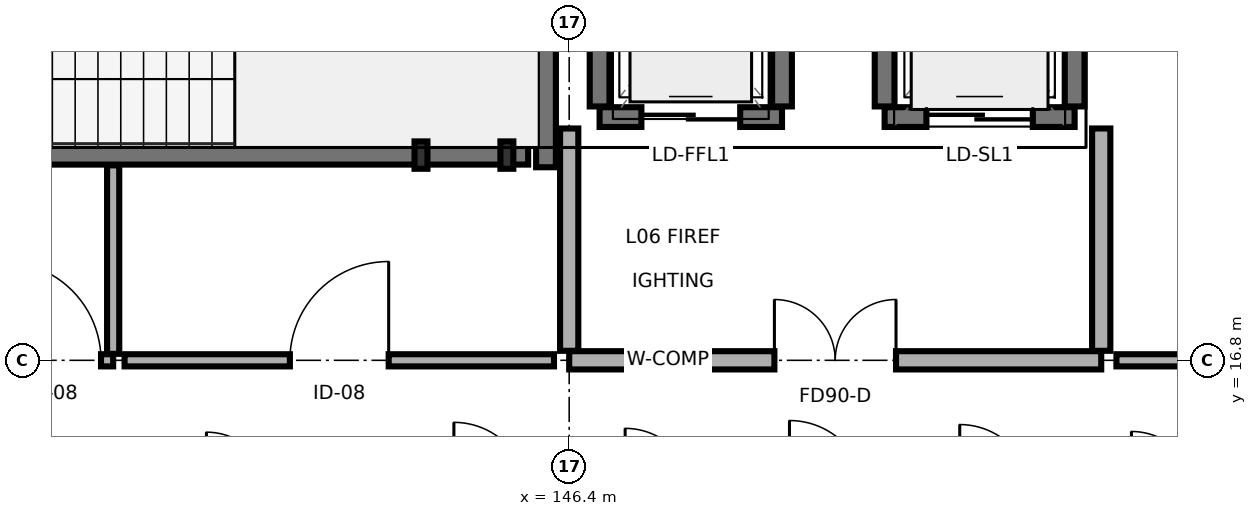
"""IFC4 building model, lengths in metres.
Left out: names, types, materials, properties, quantities, classifications, styles, units other than length and angle.
Written with IfcOpenShell. Run it as: python <this file> out.ifc"""

import sys

from ifc_helpers import new_model, si_unit, direction, frame, frame_2d, origin, origin_2d, place, context, subcontext, project, spatial, rectangle, i_section, extrude, element, fill, save


model = new_model("IFC4")
c1 = context("Model", 3, precision=1e-05, world=origin(), true_north=direction((0.0, 1.0)))
c2 = subcontext(c1, "Body", "Model", "MODEL_VIEW")
j1 = project(units=[si_unit("LENGTHUNIT", "METRE"), si_unit("PLANEANGLEUNIT", "RADIAN")], contexts=[c1])
p1 = place(None, origin())
s1 = spatial("IfcSite", under=j1, at=p1, CompositionType="ELEMENT")
p2 = place(p1, origin())
s2 = spatial("IfcBuilding", under=s1, at=p2, CompositionType="ELEMENT")
p3 = place(p2, frame((0.0, 0.0, 21.5)))
s3 = spatial("IfcBuildingStorey", under=s2, at=p3, CompositionType="ELEMENT", Elevation=21.5)
for number, where, z_axis, x_axis in (
    (1, (144.45, 19.5, 0.0), (0.0, 0.0, 1.0), (1.0, 0.0, 0.0)),
    (2, (145.58, 19.5, 0.0), (0.0, 0.0, 1.0), (1.0, 0.0, 0.0)),
):
    element("IfcColumn", number, at=place(p3, frame(where, z_axis=z_axis, x_axis=x_axis)), inside=s3, PredefinedType="PILASTER", context=c2, shape_type="SweptSolid", body=[
        extrude(i_section(OverallWidth=0.17, OverallDepth=0.36, WebThickness=0.008, FlangeThickness=0.013, FilletRadius=0.018, at=origin_2d()), origin(), (0.0, 0.0, 1.0), 3.4),
    ])
p4 = place(p3, frame((146.095, 19.34, 0.0), z_axis=(0.0, 0.0, 1.0), x_axis=(0.0, 1.0, 0.0)))
e3 = element("IfcWall", 3, at=p4, inside=s3, PredefinedType="SHEAR", context=c2, shape_type="SweptSolid", body=[
    extrude(rectangle(XDim=4.27, YDim=0.26, at=frame_2d((2.135, 0.0))), origin(), (0.0, 0.0, 1.0), 3.195),
])
p5 = place(p3, frame((137.34, 19.505, 0.0), z_axis=(0.0, 0.0, 1.0), x_axis=(1.0, 0.0, 0.0)))
e4 = element("IfcWall", 4, at=p5, inside=s3, PredefinedType="SHEAR", context=c2, shape_type="SweptSolid", body=[
    extrude(rectangle(XDim=8.52, YDim=0.26, at=frame_2d((4.26, 0.0))), origin(), (0.0, 0.0, 1.0), 3.195),
])
p6 = place(p3, frame((146.8, 20.0, 0.0), z_axis=(0.0, 0.0, 1.0), x_axis=(1.0, 0.0, 0.0)))
e5 = element("IfcWall", 5, at=p6, inside=s3, PredefinedType="SHEAR", context=c2, shape_type="SweptSolid", body=[
    extrude(rectangle(XDim=2.4, YDim=0.26, at=frame_2d((1.2, 0.0))), origin(), (0.0, 0.0, 1.0), 3.195),
])
p7 = place(p6, frame((0.55, 0.0, 0.0)))
e6 = element("IfcOpeningElement", 6, at=p7, cuts=e5, PredefinedType="OPENING", context=c2, shape_type="SweptSolid", body=[
    extrude(rectangle(XDim=1.3, YDim=2.25, at=frame_2d((0.65, 1.125))), frame((0.0, 0.14, 0.0), z_axis=(0.0, -1.0, 0.0), x_axis=(1.0, 0.0, 0.0)), (0.0, 0.0, 1.0), 0.28),
])
for number, where, z_axis, x_axis in (
    (7, (146.8, 20.14, 0.0), (0.0, 0.0, 1.0), (0.0, 1.0, 0.0)),
    (8, (149.2, 20.14, 0.0), (0.0, 0.0, 1.0), (0.0, 1.0, 0.0)),
):
    element("IfcWall", number, at=place(p3, frame(where, z_axis=z_axis, x_axis=x_axis)), inside=s3, PredefinedType="SHEAR", context=c2, shape_type="SweptSolid", body=[
        extrude(rectangle(XDim=2.52, YDim=0.26, at=frame_2d((1.26, 0.0))), origin(), (0.0, 0.0, 1.0), 3.195),
    ])
p8 = place(p3, frame((150.55, 20.0, 0.0), z_axis=(0.0, 0.0, 1.0), x_axis=(1.0, 0.0, 0.0)))
e9 = element("IfcWall", 9, at=p8, inside=s3, PredefinedType="SHEAR", context=c2, shape_type="SweptSolid", body=[
    extrude(rectangle(XDim=2.5, YDim=0.26, at=frame_2d((1.25, 0.0))), origin(), (0.0, 0.0, 1.0), 3.195),
])
p9 = place(p8, frame((0.55, 0.0, 0.0)))
e10 = element("IfcOpeningElement", 10, at=p9, cuts=e9, PredefinedType="OPENING", context=c2, shape_type="SweptSolid", body=[
    extrude(rectangle(XDim=1.4, YDim=2.3, at=frame_2d((0.7, 1.15))), frame((0.0, 0.14, 0.0), z_axis=(0.0, -1.0, 0.0), x_axis=(1.0, 0.0, 0.0)), (0.0, 0.0, 1.0), 0.28),
])
for number, where, z_axis, x_axis in (
    (11, (150.55, 20.14, 0.0), (0.0, 0.0, 1.0), (0.0, 1.0, 0.0)),
    (12, (153.05, 20.14, 0.0), (0.0, 0.0, 1.0), (0.0, 1.0, 0.0)),
):
    element("IfcWall", number, at=place(p3, frame(where, z_axis=z_axis, x_axis=x_axis)), inside=s3, PredefinedType="SHEAR", context=c2, shape_type="SweptSolid", body=[
        extrude(rectangle(XDim=2.52, YDim=0.26, at=frame_2d((1.26, 0.0))), origin(), (0.0, 0.0, 1.0), 3.195),
    ])
p10 = place(p3, frame((146.4, 16.8, 0.0), z_axis=(0.0, 0.0, 1.0), x_axis=(1.0, 0.0, 0.0)))
e13 = element("IfcWall", 13, at=p10, inside=s3, PredefinedType="SOLIDWALL", context=c2, shape_type="SweptSolid", body=[
    extrude(rectangle(XDim=7.0, YDim=0.24, at=frame_2d((3.5, 0.0))), origin(), (0.0, 0.0, 1.0), 2.73),
])
p11 = place(p10, frame((2.7, 0.0, 0.0)))
e14 = element("IfcOpeningElement", 14, at=p11, cuts=e13, PredefinedType="OPENING", context=c2, shape_type="SweptSolid", body=[
    extrude(rectangle(XDim=1.6, YDim=2.2, at=frame_2d((0.8, 1.1))), frame((0.0, 0.13, 0.0), z_axis=(0.0, -1.0, 0.0), x_axis=(1.0, 0.0, 0.0)), (0.0, 0.0, 1.0), 0.26),
])
for number, where, z_axis, x_axis in (
    (15, (146.4, 16.925, 0.0), (0.0, 0.0, 1.0), (0.0, 1.0, 0.0)),
    (16, (153.4, 16.925, 0.0), (0.0, 0.0, 1.0), (0.0, 1.0, 0.0)),
):
    element("IfcWall", number, at=place(p3, frame(where, z_axis=z_axis, x_axis=x_axis)), inside=s3, PredefinedType="SOLIDWALL", context=c2, shape_type="SweptSolid", body=[
        extrude(rectangle(XDim=2.925, YDim=0.24, at=frame_2d((1.462, 0.0))), origin(), (0.0, 0.0, 1.0), 2.73),
    ])
p12 = place(p3, frame((135.0, 16.8, 0.0), z_axis=(0.0, 0.0, 1.0), x_axis=(1.0, 0.0, 0.0)))
e17 = element("IfcWall", 17, at=p12, inside=s3, PredefinedType="PARTITIONING", context=c2, shape_type="SweptSolid", body=[
    extrude(rectangle(XDim=5.4, YDim=0.16, at=frame_2d((2.7, 0.0))), origin(), (0.0, 0.0, 1.0), 2.73),
])
p13 = place(p12, frame((3.94, 0.0, 0.0)))
e18 = element("IfcOpeningElement", 18, at=p13, cuts=e17, PredefinedType="OPENING", context=c2, shape_type="SweptSolid", body=[
    extrude(rectangle(XDim=1.3, YDim=2.2, at=frame_2d((0.65, 1.1))), frame((0.0, 0.09, 0.0), z_axis=(0.0, -1.0, 0.0), x_axis=(1.0, 0.0, 0.0)), (0.0, 0.0, 1.0), 0.18),
])
p14 = place(p3, frame((140.4, 16.885, 0.0), z_axis=(0.0, 0.0, 1.0), x_axis=(0.0, 1.0, 0.0)))
e19 = element("IfcWall", 19, at=p14, inside=s3, PredefinedType="PARTITIONING", context=c2, shape_type="SweptSolid", body=[
    extrude(rectangle(XDim=2.48, YDim=0.16, at=frame_2d((1.24, 0.0))), origin(), (0.0, 0.0, 1.0), 2.73),
])
p15 = place(p3, frame((140.55, 16.8, 0.0), z_axis=(0.0, 0.0, 1.0), x_axis=(1.0, 0.0, 0.0)))
e20 = element("IfcWall", 20, at=p15, inside=s3, PredefinedType="PARTITIONING", context=c2, shape_type="SweptSolid", body=[
    extrude(rectangle(XDim=5.65, YDim=0.16, at=frame_2d((2.825, 0.0))), origin(), (0.0, 0.0, 1.0), 2.73),
])
p16 = place(p15, frame((2.175, 0.0, 0.0)))
e21 = element("IfcOpeningElement", 21, at=p16, cuts=e20, PredefinedType="OPENING", context=c2, shape_type="SweptSolid", body=[
    extrude(rectangle(XDim=1.3, YDim=2.2, at=frame_2d((0.65, 1.1))), frame((0.0, 0.09, 0.0), z_axis=(0.0, -1.0, 0.0), x_axis=(1.0, 0.0, 0.0)), (0.0, 0.0, 1.0), 0.18),
])
p17 = place(p3, frame((153.6, 16.8, 0.0), z_axis=(0.0, 0.0, 1.0), x_axis=(1.0, 0.0, 0.0)))
e22 = element("IfcWall", 22, at=p17, inside=s3, PredefinedType="PARTITIONING", context=c2, shape_type="SweptSolid", body=[
    extrude(rectangle(XDim=1.8, YDim=0.16, at=frame_2d((0.9, 0.0))), origin(), (0.0, 0.0, 1.0), 2.73),
])
p18 = place(p7, origin())
e23 = element("IfcDoor", 23, at=p18, inside=s3, OperationType="SLIDING_TO_RIGHT", PredefinedType="DOOR", context=c2, shape_type="SweptSolid", body=[
    extrude(rectangle(XDim=1.3, YDim=2.25, at=frame_2d((0.65, 1.125))), frame((0.0, 0.025, 0.0), z_axis=(0.0, -1.0, 0.0), x_axis=(1.0, 0.0, 0.0)), (0.0, 0.0, 1.0), 0.05),
])
fill(e6, e23)
p19 = place(p9, origin())
e24 = element("IfcDoor", 24, at=p19, inside=s3, OperationType="SLIDING_TO_LEFT", PredefinedType="DOOR", context=c2, shape_type="SweptSolid", body=[
    extrude(rectangle(XDim=1.4, YDim=2.3, at=frame_2d((0.7, 1.15))), frame((0.0, 0.025, 0.0), z_axis=(0.0, -1.0, 0.0), x_axis=(1.0, 0.0, 0.0)), (0.0, 0.0, 1.0), 0.05),
])
fill(e10, e24)
p20 = place(p11, origin())
e25 = element("IfcDoor", 25, at=p20, inside=s3, OperationType="DOUBLE_DOOR_SINGLE_SWING", PredefinedType="DOOR", context=c2, shape_type="SweptSolid", body=[
    extrude(rectangle(XDim=1.6, YDim=2.2, at=frame_2d((0.8, 1.1))), frame((0.0, 0.025, 0.0), z_axis=(0.0, -1.0, 0.0), x_axis=(1.0, 0.0, 0.0)), (0.0, 0.0, 1.0), 0.05),
])
fill(e14, e25)
p21 = place(p13, origin())
e26 = element("IfcDoor", 26, at=p21, inside=s3, OperationType="SINGLE_SWING_LEFT", PredefinedType="DOOR", context=c2, shape_type="SweptSolid", body=[
    extrude(rectangle(XDim=1.3, YDim=2.2, at=frame_2d((0.65, 1.1))), frame((0.0, 0.025, 0.0), z_axis=(0.0, -1.0, 0.0), x_axis=(1.0, 0.0, 0.0)), (0.0, 0.0, 1.0), 0.05),
])
fill(e18, e26)
p22 = place(p16, origin())
e27 = element("IfcDoor", 27, at=p22, inside=s3, OperationType="SINGLE_SWING_RIGHT", PredefinedType="DOOR", context=c2, shape_type="SweptSolid", body=[
    extrude(rectangle(XDim=1.3, YDim=2.2, at=frame_2d((0.65, 1.1))), frame((0.0, 0.025, 0.0), z_axis=(0.0, -1.0, 0.0), x_axis=(1.0, 0.0, 0.0)), (0.0, 0.0, 1.0), 0.05),
])
fill(e21, e27)
save(model, sys.argv[1])
